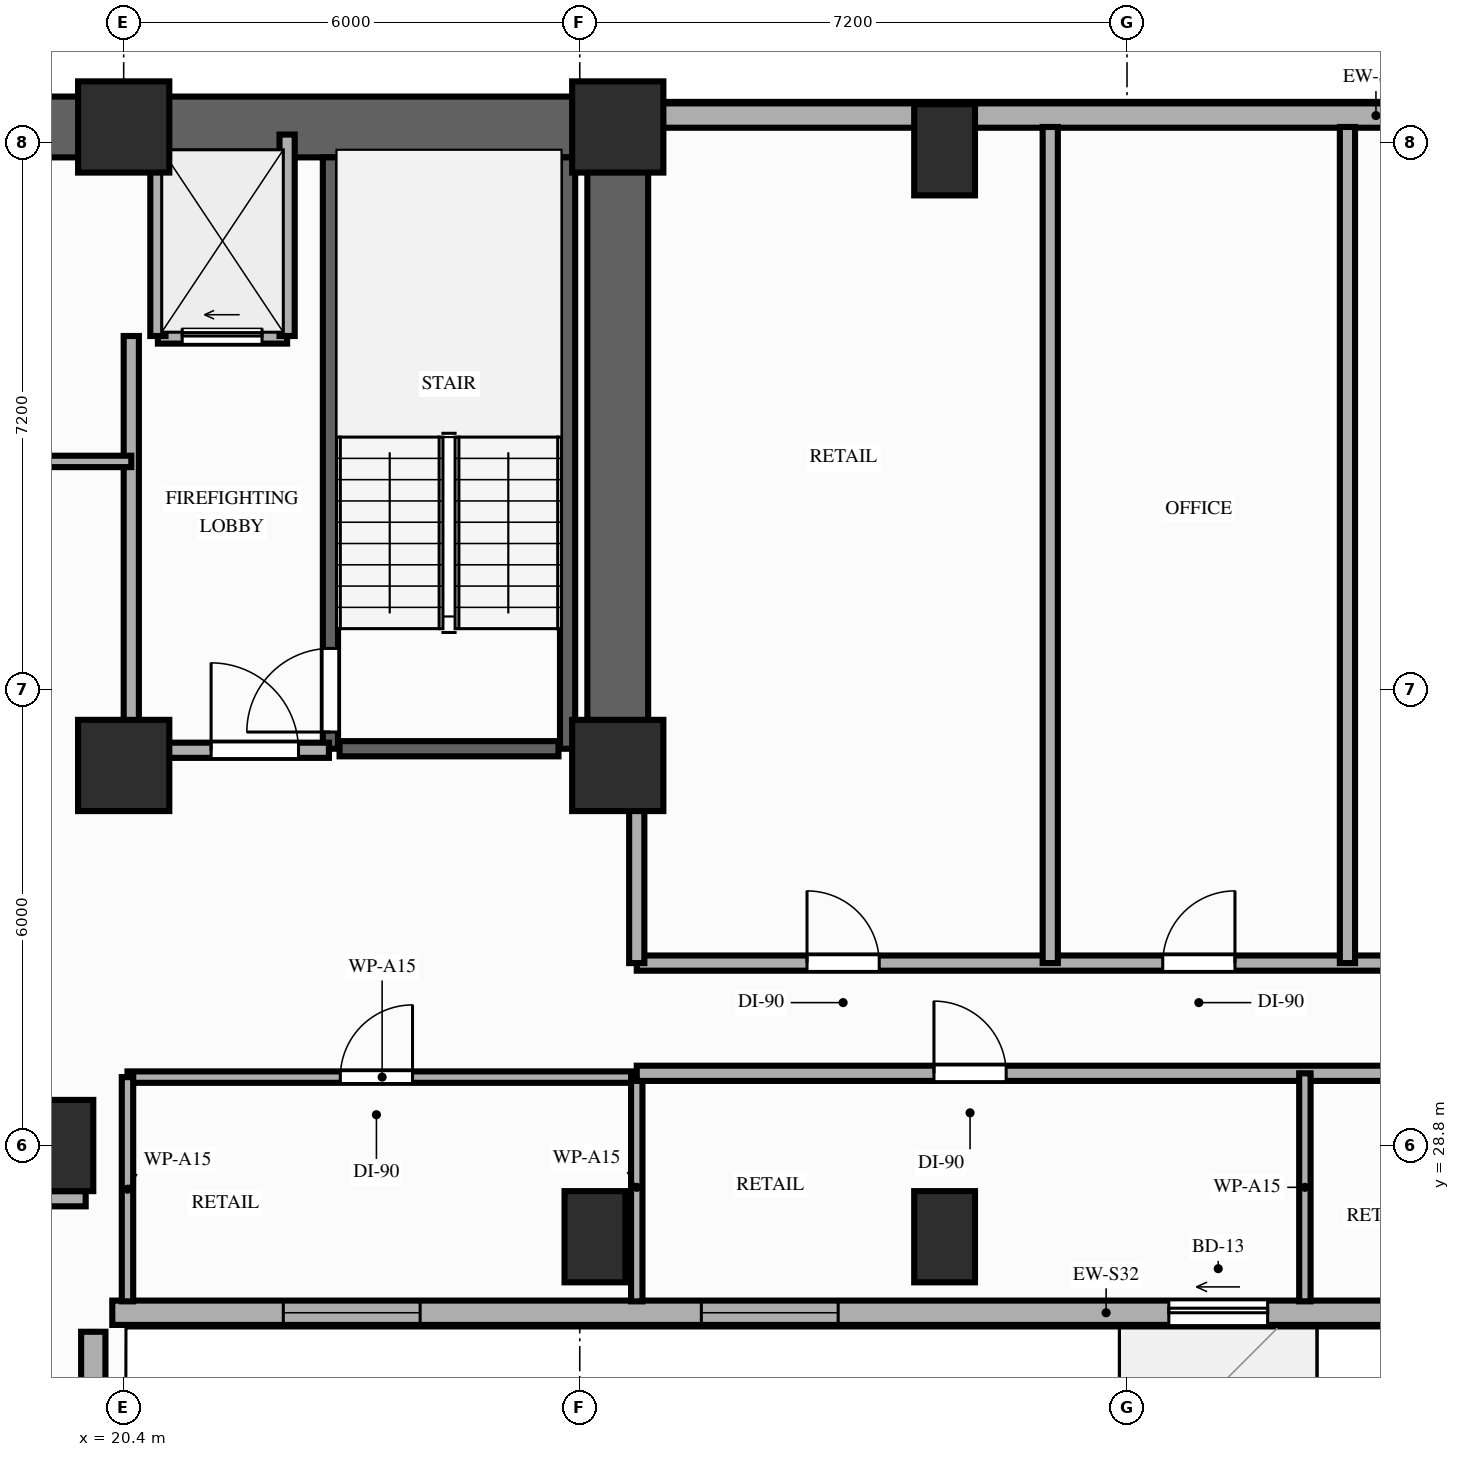
"""IFC4 building model, lengths in metres.
Left out: names, types, materials, properties, quantities, classifications, styles, units other than length and angle.
Written with IfcOpenShell. Run it as: python <this file> out.ifc"""

import sys

from ifc_helpers import new_model, si_unit, direction, frame, frame_2d, origin, origin_2d, place, context, subcontext, project, spatial, rectangle, extrude, element, fill, save


model = new_model("IFC4")
c1 = context("Model", 3, precision=1e-05, world=origin(), true_north=direction((0.0, 1.0)))
c2 = subcontext(c1, "Body", "Model", "MODEL_VIEW")
j1 = project(units=[si_unit("LENGTHUNIT", "METRE"), si_unit("PLANEANGLEUNIT", "RADIAN")], contexts=[c1])
p1 = place(None, origin())
s1 = spatial("IfcSite", under=j1, at=p1, CompositionType="ELEMENT")
p2 = place(p1, origin())
s2 = spatial("IfcBuilding", under=s1, at=p2, CompositionType="ELEMENT")
p3 = place(p2, frame((0.0, 0.0, 96.2)))
s3 = spatial("IfcBuildingStorey", under=s2, at=p3, CompositionType="ELEMENT", Elevation=96.2)
for number, where, z_axis, x_axis in (
    (1, (20.4, 33.8, 0.0), (0.0, 0.0, 1.0), (1.0, 0.0, 0.0)),
    (2, (26.9, 33.8, 0.0), (0.0, 0.0, 1.0), (1.0, 0.0, 0.0)),
    (3, (20.4, 42.2, 0.0), (0.0, 0.0, 1.0), (1.0, 0.0, 0.0)),
    (4, (26.9, 42.2, 0.0), (0.0, 0.0, 1.0), (1.0, 0.0, 0.0)),
):
    element("IfcColumn", number, at=place(p3, frame(where, z_axis=z_axis, x_axis=x_axis)), inside=s3, PredefinedType="COLUMN", context=c2, shape_type="SweptSolid", body=[
        extrude(rectangle(XDim=1.2, YDim=1.2, at=origin_2d()), origin(), (0.0, 0.0, 1.0), 3.2),
    ])
for number, where, z_axis, x_axis in (
    (5, (19.6, 28.8, 0.0), (0.0, 0.0, 1.0), (1.0, 0.0, 0.0)),
    (6, (26.6, 27.6, 0.0), (0.0, 0.0, 1.0), (1.0, 0.0, 0.0)),
    (7, (31.2, 27.6, 0.0), (0.0, 0.0, 1.0), (1.0, 0.0, 0.0)),
    (8, (31.2, 41.9, 0.0), (0.0, 0.0, 1.0), (1.0, 0.0, 0.0)),
):
    element("IfcColumn", number, at=place(p3, frame(where, z_axis=z_axis, x_axis=x_axis)), inside=s3, PredefinedType="COLUMN", context=c2, shape_type="SweptSolid", body=[
        extrude(rectangle(XDim=0.8, YDim=1.2, at=origin_2d()), origin(), (0.0, 0.0, 1.0), 3.2),
    ])
p4 = place(p3, frame((20.0, 8.8, 0.0), z_axis=(0.0, 0.0, 1.0), x_axis=(0.0, 1.0, 0.0)))
e9 = element("IfcWall", 9, at=p4, inside=s3, PredefinedType="STANDARD", context=c2, shape_type="SweptSolid", body=[
    extrude(rectangle(XDim=17.55, YDim=0.32, at=frame_2d((8.775, 0.0))), origin(), (0.0, 0.0, 1.0), 2.41),
])
p5 = place(p4, frame((11.0, 0.0, 0.85)))
e10 = element("IfcOpeningElement", 10, at=p5, cuts=e9, PredefinedType="OPENING", context=c2, shape_type="SweptSolid", body=[
    extrude(rectangle(XDim=1.8, YDim=1.31, at=frame_2d((0.9, 0.655))), frame((0.0, 0.17, 0.0), z_axis=(0.0, -1.0, 0.0), x_axis=(1.0, 0.0, 0.0)), (0.0, 0.0, 1.0), 0.34),
])
p6 = place(p3, frame((46.4, 42.35, 0.0), z_axis=(0.0, 0.0, 1.0), x_axis=(-1.0, 0.0, 0.0)))
e11 = element("IfcWall", 11, at=p6, inside=s3, PredefinedType="STANDARD", context=c2, shape_type="SweptSolid", body=[
    extrude(rectangle(XDim=19.05, YDim=0.32, at=frame_2d((9.525, 0.0))), origin(), (0.0, 0.0, 1.0), 2.41),
])
p7 = place(p3, frame((20.25, 26.6, 0.0), z_axis=(0.0, 0.0, 1.0), x_axis=(1.0, 0.0, 0.0)))
e12 = element("IfcWall", 12, at=p7, inside=s3, PredefinedType="STANDARD", context=c2, shape_type="SweptSolid", body=[
    extrude(rectangle(XDim=26.15, YDim=0.32, at=frame_2d((13.075, 0.0))), origin(), (0.0, 0.0, 1.0), 2.71),
])
p8 = place(p7, frame((13.9, 0.0, 0.0)))
e13 = element("IfcOpeningElement", 13, at=p8, cuts=e12, PredefinedType="OPENING", context=c2, shape_type="SweptSolid", body=[
    extrude(rectangle(XDim=1.3, YDim=2.08, at=frame_2d((0.65, 1.04))), frame((0.0, 0.17, 0.0), z_axis=(0.0, -1.0, 0.0), x_axis=(1.0, 0.0, 0.0)), (0.0, 0.0, 1.0), 0.34),
])
p9 = place(p7, frame((2.25, 0.0, 0.85)))
e14 = element("IfcOpeningElement", 14, at=p9, cuts=e12, PredefinedType="OPENING", context=c2, shape_type="SweptSolid", body=[
    extrude(rectangle(XDim=1.8, YDim=1.61, at=frame_2d((0.9, 0.805))), frame((0.0, 0.17, 0.0), z_axis=(0.0, -1.0, 0.0), x_axis=(1.0, 0.0, 0.0)), (0.0, 0.0, 1.0), 0.34),
])
p10 = place(p7, frame((7.75, 0.0, 0.85)))
e15 = element("IfcOpeningElement", 15, at=p10, cuts=e12, PredefinedType="OPENING", context=c2, shape_type="SweptSolid", body=[
    extrude(rectangle(XDim=1.8, YDim=1.61, at=frame_2d((0.9, 0.805))), frame((0.0, 0.17, 0.0), z_axis=(0.0, -1.0, 0.0), x_axis=(1.0, 0.0, 0.0)), (0.0, 0.0, 1.0), 0.34),
])
p11 = place(p7, frame((22.25, 0.0, 0.85)))
e16 = element("IfcOpeningElement", 16, at=p11, cuts=e12, PredefinedType="OPENING", context=c2, shape_type="SweptSolid", body=[
    extrude(rectangle(XDim=1.8, YDim=1.61, at=frame_2d((0.9, 0.805))), frame((0.0, 0.17, 0.0), z_axis=(0.0, -1.0, 0.0), x_axis=(1.0, 0.0, 0.0)), (0.0, 0.0, 1.0), 0.34),
])
p12 = place(p3, frame((6.45, 42.2, 0.0), z_axis=(0.0, 0.0, 1.0), x_axis=(1.0, 0.0, 0.0)))
e17 = element("IfcWall", 17, at=p12, inside=s3, PredefinedType="SHEAR", context=c2, shape_type="SweptSolid", body=[
    extrude(rectangle(XDim=20.45, YDim=0.8, at=frame_2d((10.225, 0.0))), origin(), (0.0, 0.0, 1.0), 3.02),
])
p13 = place(p3, frame((26.9, 33.8, 0.0), z_axis=(0.0, 0.0, 1.0), x_axis=(0.0, 1.0, 0.0)))
e18 = element("IfcWall", 18, at=p13, inside=s3, PredefinedType="SHEAR", context=c2, shape_type="SweptSolid", body=[
    extrude(rectangle(XDim=7.95, YDim=0.8, at=frame_2d((3.975, 0.0))), origin(), (0.0, 0.0, 1.0), 3.02),
])
p14 = place(p3, frame((23.12, 34.02, 0.0), z_axis=(0.0, 0.0, 1.0), x_axis=(0.0, 1.0, 0.0)))
e19 = element("IfcWall", 19, at=p14, inside=s3, PredefinedType="SHEAR", context=c2, shape_type="SweptSolid", body=[
    extrude(rectangle(XDim=7.78, YDim=0.2, at=frame_2d((3.89, 0.0))), origin(), (0.0, 0.0, 1.0), 3.02),
])
p15 = place(p14, frame((0.22, 0.0, 0.0)))
e20 = element("IfcOpeningElement", 20, at=p15, cuts=e19, PredefinedType="OPENING", context=c2, shape_type="SweptSolid", body=[
    extrude(rectangle(XDim=1.1, YDim=2.15, at=frame_2d((0.55, 1.075))), frame((0.0, 0.11, 0.0), z_axis=(0.0, -1.0, 0.0), x_axis=(1.0, 0.0, 0.0)), (0.0, 0.0, 1.0), 0.22),
])
p16 = place(p3, frame((26.24, 34.02, 0.0), z_axis=(0.0, 0.0, 1.0), x_axis=(0.0, 1.0, 0.0)))
e21 = element("IfcWall", 21, at=p16, inside=s3, PredefinedType="SHEAR", context=c2, shape_type="SweptSolid", body=[
    extrude(rectangle(XDim=7.78, YDim=0.2, at=frame_2d((3.89, 0.0))), origin(), (0.0, 0.0, 1.0), 3.02),
])
p17 = place(p3, frame((23.24, 34.02, 0.0), z_axis=(0.0, 0.0, 1.0), x_axis=(1.0, 0.0, 0.0)))
e22 = element("IfcWall", 22, at=p17, inside=s3, PredefinedType="SHEAR", context=c2, shape_type="SweptSolid", body=[
    extrude(rectangle(XDim=2.88, YDim=0.2, at=frame_2d((1.44, 0.0))), origin(), (0.0, 0.0, 1.0), 3.02),
])
p18 = place(p3, frame((20.85, 39.45, 0.0), z_axis=(0.0, 0.0, 1.0), x_axis=(1.0, 0.0, 0.0)))
e23 = element("IfcWall", 23, at=p18, inside=s3, PredefinedType="MOVABLE", context=c2, shape_type="SweptSolid", body=[
    extrude(rectangle(XDim=1.7, YDim=0.2, at=frame_2d((0.85, 0.0))), origin(), (0.0, 0.0, 1.0), 3.02),
])
p19 = place(p18, frame((0.32, 0.0, 0.0)))
e24 = element("IfcOpeningElement", 24, at=p19, cuts=e23, PredefinedType="OPENING", context=c2, shape_type="SweptSolid", body=[
    extrude(rectangle(XDim=1.05, YDim=2.15, at=frame_2d((0.525, 1.075))), frame((0.0, 0.11, 0.0), z_axis=(0.0, -1.0, 0.0), x_axis=(1.0, 0.0, 0.0)), (0.0, 0.0, 1.0), 0.22),
])
for number, where, z_axis, x_axis in (
    (25, (20.85, 39.45, 0.0), (0.0, 0.0, 1.0), (0.0, 1.0, 0.0)),
    (26, (22.55, 39.45, 0.0), (0.0, 0.0, 1.0), (0.0, 1.0, 0.0)),
):
    element("IfcWall", number, at=place(p3, frame(where, z_axis=z_axis, x_axis=x_axis)), inside=s3, PredefinedType="MOVABLE", context=c2, shape_type="SweptSolid", body=[
        extrude(rectangle(XDim=2.65, YDim=0.2, at=frame_2d((1.325, 0.0))), origin(), (0.0, 0.0, 1.0), 2.41),
    ])
p20 = place(p3, frame((20.5, 34.0, 0.0), z_axis=(0.0, 0.0, 1.0), x_axis=(0.0, 1.0, 0.0)))
e27 = element("IfcWall", 27, at=p20, inside=s3, PredefinedType="PARTITIONING", context=c2, shape_type="SweptSolid", body=[
    extrude(rectangle(XDim=5.45, YDim=0.2, at=frame_2d((2.725, 0.0))), origin(), (0.0, 0.0, 1.0), 2.41),
])
p21 = place(p3, frame((20.5, 34.0, 0.0), z_axis=(0.0, 0.0, 1.0), x_axis=(1.0, 0.0, 0.0)))
e28 = element("IfcWall", 28, at=p21, inside=s3, PredefinedType="PARTITIONING", context=c2, shape_type="SweptSolid", body=[
    extrude(rectangle(XDim=2.6, YDim=0.2, at=frame_2d((1.3, 0.0))), origin(), (0.0, 0.0, 1.0), 2.41),
])
p22 = place(p21, frame((1.05, 0.0, 0.0)))
e29 = element("IfcOpeningElement", 29, at=p22, cuts=e28, PredefinedType="OPENING", context=c2, shape_type="SweptSolid", body=[
    extrude(rectangle(XDim=1.15, YDim=2.15, at=frame_2d((0.575, 1.075))), frame((0.0, 0.11, 0.0), z_axis=(0.0, -1.0, 0.0), x_axis=(1.0, 0.0, 0.0)), (0.0, 0.0, 1.0), 0.22),
])
p23 = place(p3, frame((12.9, 37.8, 0.0), z_axis=(0.0, 0.0, 1.0), x_axis=(1.0, 0.0, 0.0)))
e30 = element("IfcWall", 30, at=p23, inside=s3, PredefinedType="PARTITIONING", context=c2, shape_type="SweptSolid", body=[
    extrude(rectangle(XDim=7.6, YDim=0.15, at=frame_2d((3.8, 0.0))), origin(), (0.0, 0.0, 1.0), 3.02),
])
p24 = place(p23, frame((3.2, 0.0, 0.0)))
e31 = element("IfcOpeningElement", 31, at=p24, cuts=e30, PredefinedType="OPENING", context=c2, shape_type="SweptSolid", body=[
    extrude(rectangle(XDim=1.0, YDim=2.15, at=frame_2d((0.5, 1.075))), frame((0.0, 0.085, 0.0), z_axis=(0.0, -1.0, 0.0), x_axis=(1.0, 0.0, 0.0)), (0.0, 0.0, 1.0), 0.17),
])
p25 = place(p3, frame((14.66, 28.1, 0.0), z_axis=(0.0, 0.0, 1.0), x_axis=(1.0, 0.0, 0.0)))
e32 = element("IfcWall", 32, at=p25, inside=s3, PredefinedType="PARTITIONING", context=c2, shape_type="SweptSolid", body=[
    extrude(rectangle(XDim=5.24, YDim=0.2, at=frame_2d((2.62, 0.0))), origin(), (0.0, 0.0, 1.0), 2.41),
])
p26 = place(p3, frame((20.45, 29.7, 0.0), z_axis=(0.0, 0.0, 1.0), x_axis=(1.0, 0.0, 0.0)))
e33 = element("IfcWall", 33, at=p26, inside=s3, PredefinedType="PARTITIONING", context=c2, shape_type="SweptSolid", body=[
    extrude(rectangle(XDim=6.7, YDim=0.15, at=frame_2d((3.35, 0.0))), origin(), (0.0, 0.0, 1.0), 3.02),
])
p27 = place(p26, frame((2.8, 0.0, 0.0)))
e34 = element("IfcOpeningElement", 34, at=p27, cuts=e33, PredefinedType="OPENING", context=c2, shape_type="SweptSolid", body=[
    extrude(rectangle(XDim=0.95, YDim=2.15, at=frame_2d((0.475, 1.075))), frame((0.0, 0.085, 0.0), z_axis=(0.0, -1.0, 0.0), x_axis=(1.0, 0.0, 0.0)), (0.0, 0.0, 1.0), 0.17),
])
p28 = place(p3, frame((20.45, 26.75, 0.0), z_axis=(0.0, 0.0, 1.0), x_axis=(0.0, 1.0, 0.0)))
e35 = element("IfcWall", 35, at=p28, inside=s3, PredefinedType="PARTITIONING", context=c2, shape_type="SweptSolid", body=[
    extrude(rectangle(XDim=2.95, YDim=0.15, at=frame_2d((1.475, 0.0))), origin(), (0.0, 0.0, 1.0), 2.41),
])
p29 = place(p3, frame((27.15, 26.75, 0.0), z_axis=(0.0, 0.0, 1.0), x_axis=(0.0, 1.0, 0.0)))
e36 = element("IfcWall", 36, at=p29, inside=s3, PredefinedType="PARTITIONING", context=c2, shape_type="SweptSolid", body=[
    extrude(rectangle(XDim=3.0, YDim=0.15, at=frame_2d((1.5, 0.0))), origin(), (0.0, 0.0, 1.0), 2.41),
])
p30 = place(p3, frame((27.15, 29.75, 0.0), z_axis=(0.0, 0.0, 1.0), x_axis=(1.0, 0.0, 0.0)))
e37 = element("IfcWall", 37, at=p30, inside=s3, PredefinedType="PARTITIONING", context=c2, shape_type="SweptSolid", body=[
    extrude(rectangle(XDim=13.95, YDim=0.2, at=frame_2d((6.975, 0.0))), origin(), (0.0, 0.0, 1.0), 2.41),
])
p31 = place(p30, frame((3.91, 0.0, 0.0)))
e38 = element("IfcOpeningElement", 38, at=p31, cuts=e37, PredefinedType="OPENING", context=c2, shape_type="SweptSolid", body=[
    extrude(rectangle(XDim=0.95, YDim=2.15, at=frame_2d((0.475, 1.075))), frame((0.0, 0.11, 0.0), z_axis=(0.0, -1.0, 0.0), x_axis=(1.0, 0.0, 0.0)), (0.0, 0.0, 1.0), 0.22),
])
p32 = place(p30, frame((10.89, 0.0, 0.0)))
e39 = element("IfcOpeningElement", 39, at=p32, cuts=e37, PredefinedType="OPENING", context=c2, shape_type="SweptSolid", body=[
    extrude(rectangle(XDim=0.95, YDim=2.15, at=frame_2d((0.475, 1.075))), frame((0.0, 0.11, 0.0), z_axis=(0.0, -1.0, 0.0), x_axis=(1.0, 0.0, 0.0)), (0.0, 0.0, 1.0), 0.22),
])
p33 = place(p3, frame((27.15, 31.2, 0.0), z_axis=(0.0, 0.0, 1.0), x_axis=(1.0, 0.0, 0.0)))
e40 = element("IfcWall", 40, at=p33, inside=s3, PredefinedType="PARTITIONING", context=c2, shape_type="SweptSolid", body=[
    extrude(rectangle(XDim=13.95, YDim=0.2, at=frame_2d((6.975, 0.0))), origin(), (0.0, 0.0, 1.0), 2.41),
])
p34 = place(p33, frame((2.24, 0.0, 0.0)))
e41 = element("IfcOpeningElement", 41, at=p34, cuts=e40, PredefinedType="OPENING", context=c2, shape_type="SweptSolid", body=[
    extrude(rectangle(XDim=0.95, YDim=2.15, at=frame_2d((0.475, 1.075))), frame((0.0, 0.11, 0.0), z_axis=(0.0, -1.0, 0.0), x_axis=(1.0, 0.0, 0.0)), (0.0, 0.0, 1.0), 0.22),
])
p35 = place(p33, frame((6.92, 0.0, 0.0)))
e42 = element("IfcOpeningElement", 42, at=p35, cuts=e40, PredefinedType="OPENING", context=c2, shape_type="SweptSolid", body=[
    extrude(rectangle(XDim=0.95, YDim=2.15, at=frame_2d((0.475, 1.075))), frame((0.0, 0.11, 0.0), z_axis=(0.0, -1.0, 0.0), x_axis=(1.0, 0.0, 0.0)), (0.0, 0.0, 1.0), 0.22),
])
p36 = place(p33, frame((11.17, 0.0, 0.0)))
e43 = element("IfcOpeningElement", 43, at=p36, cuts=e40, PredefinedType="OPENING", context=c2, shape_type="SweptSolid", body=[
    extrude(rectangle(XDim=0.95, YDim=2.15, at=frame_2d((0.475, 1.075))), frame((0.0, 0.11, 0.0), z_axis=(0.0, -1.0, 0.0), x_axis=(1.0, 0.0, 0.0)), (0.0, 0.0, 1.0), 0.22),
])
p37 = place(p3, frame((27.15, 31.2, 0.0), z_axis=(0.0, 0.0, 1.0), x_axis=(0.0, 1.0, 0.0)))
e44 = element("IfcWall", 44, at=p37, inside=s3, PredefinedType="PARTITIONING", context=c2, shape_type="SweptSolid", body=[
    extrude(rectangle(XDim=2.48, YDim=0.2, at=frame_2d((1.24, 0.0))), origin(), (0.0, 0.0, 1.0), 2.41),
])
p38 = place(p3, frame((35.94, 26.75, 0.0), z_axis=(0.0, 0.0, 1.0), x_axis=(0.0, 1.0, 0.0)))
e45 = element("IfcWall", 45, at=p38, inside=s3, PredefinedType="PARTITIONING", context=c2, shape_type="SweptSolid", body=[
    extrude(rectangle(XDim=3.0, YDim=0.15, at=frame_2d((1.5, 0.0))), origin(), (0.0, 0.0, 1.0), 2.41),
])
for number, where, z_axis, x_axis in (
    (46, (32.59, 31.2, 0.0), (0.0, 0.0, 1.0), (0.0, 1.0, 0.0)),
    (47, (36.5, 31.2, 0.0), (0.0, 0.0, 1.0), (0.0, 1.0, 0.0)),
):
    element("IfcWall", number, at=place(p3, frame(where, z_axis=z_axis, x_axis=x_axis)), inside=s3, PredefinedType="PARTITIONING", context=c2, shape_type="SweptSolid", body=[
        extrude(rectangle(XDim=11.0, YDim=0.2, at=frame_2d((5.5, 0.0))), origin(), (0.0, 0.0, 1.0), 2.41),
    ])
p39 = place(p8, origin())
e48 = element("IfcDoor", 48, at=p39, inside=s3, OperationType="SLIDING_TO_LEFT", PredefinedType="DOOR", context=c2, shape_type="SweptSolid", body=[
    extrude(rectangle(XDim=1.3, YDim=2.08, at=frame_2d((0.65, 1.04))), frame((0.0, 0.025, 0.0), z_axis=(0.0, -1.0, 0.0), x_axis=(1.0, 0.0, 0.0)), (0.0, 0.0, 1.0), 0.05),
])
fill(e13, e48)
p40 = place(p9, origin())
e49 = element("IfcWindow", 49, at=p40, inside=s3, PartitioningType="SINGLE_PANEL", PredefinedType="WINDOW", context=c2, shape_type="SweptSolid", body=[
    extrude(rectangle(XDim=1.8, YDim=1.61, at=frame_2d((0.9, 0.805))), frame((0.0, 0.03, 0.0), z_axis=(0.0, -1.0, 0.0), x_axis=(1.0, 0.0, 0.0)), (0.0, 0.0, 1.0), 0.06),
])
fill(e14, e49)
p41 = place(p10, origin())
e50 = element("IfcWindow", 50, at=p41, inside=s3, PartitioningType="SINGLE_PANEL", PredefinedType="WINDOW", context=c2, shape_type="SweptSolid", body=[
    extrude(rectangle(XDim=1.8, YDim=1.61, at=frame_2d((0.9, 0.805))), frame((0.0, 0.03, 0.0), z_axis=(0.0, -1.0, 0.0), x_axis=(1.0, 0.0, 0.0)), (0.0, 0.0, 1.0), 0.06),
])
fill(e15, e50)
p42 = place(p15, origin())
e51 = element("IfcDoor", 51, at=p42, inside=s3, OperationType="SINGLE_SWING_LEFT", PredefinedType="DOOR", context=c2, shape_type="SweptSolid", body=[
    extrude(rectangle(XDim=1.1, YDim=2.15, at=frame_2d((0.55, 1.075))), frame((0.0, 0.025, 0.0), z_axis=(0.0, -1.0, 0.0), x_axis=(1.0, 0.0, 0.0)), (0.0, 0.0, 1.0), 0.05),
])
fill(e20, e51)
p43 = place(p19, origin())
e52 = element("IfcDoor", 52, at=p43, inside=s3, OperationType="SLIDING_TO_LEFT", PredefinedType="DOOR", context=c2, shape_type="SweptSolid", body=[
    extrude(rectangle(XDim=1.05, YDim=2.15, at=frame_2d((0.525, 1.075))), frame((0.0, 0.025, 0.0), z_axis=(0.0, -1.0, 0.0), x_axis=(1.0, 0.0, 0.0)), (0.0, 0.0, 1.0), 0.05),
])
fill(e24, e52)
p44 = place(p22, origin())
e53 = element("IfcDoor", 53, at=p44, inside=s3, OperationType="SINGLE_SWING_LEFT", PredefinedType="DOOR", context=c2, shape_type="SweptSolid", body=[
    extrude(rectangle(XDim=1.15, YDim=2.15, at=frame_2d((0.575, 1.075))), frame((0.0, 0.025, 0.0), z_axis=(0.0, -1.0, 0.0), x_axis=(1.0, 0.0, 0.0)), (0.0, 0.0, 1.0), 0.05),
])
fill(e29, e53)
p45 = place(p27, origin())
e54 = element("IfcDoor", 54, at=p45, inside=s3, OperationType="SINGLE_SWING_RIGHT", PredefinedType="DOOR", context=c2, shape_type="SweptSolid", body=[
    extrude(rectangle(XDim=0.95, YDim=2.15, at=frame_2d((0.475, 1.075))), frame((0.0, 0.025, 0.0), z_axis=(0.0, -1.0, 0.0), x_axis=(1.0, 0.0, 0.0)), (0.0, 0.0, 1.0), 0.05),
])
fill(e34, e54)
p46 = place(p31, origin())
e55 = element("IfcDoor", 55, at=p46, inside=s3, OperationType="SINGLE_SWING_LEFT", PredefinedType="DOOR", context=c2, shape_type="SweptSolid", body=[
    extrude(rectangle(XDim=0.95, YDim=2.15, at=frame_2d((0.475, 1.075))), frame((0.0, 0.025, 0.0), z_axis=(0.0, -1.0, 0.0), x_axis=(1.0, 0.0, 0.0)), (0.0, 0.0, 1.0), 0.05),
])
fill(e38, e55)
p47 = place(p34, origin())
e56 = element("IfcDoor", 56, at=p47, inside=s3, OperationType="SINGLE_SWING_LEFT", PredefinedType="DOOR", context=c2, shape_type="SweptSolid", body=[
    extrude(rectangle(XDim=0.95, YDim=2.15, at=frame_2d((0.475, 1.075))), frame((0.0, 0.025, 0.0), z_axis=(0.0, -1.0, 0.0), x_axis=(1.0, 0.0, 0.0)), (0.0, 0.0, 1.0), 0.05),
])
fill(e41, e56)
p48 = place(p35, origin())
e57 = element("IfcDoor", 57, at=p48, inside=s3, OperationType="SINGLE_SWING_RIGHT", PredefinedType="DOOR", context=c2, shape_type="SweptSolid", body=[
    extrude(rectangle(XDim=0.95, YDim=2.15, at=frame_2d((0.475, 1.075))), frame((0.0, 0.025, 0.0), z_axis=(0.0, -1.0, 0.0), x_axis=(1.0, 0.0, 0.0)), (0.0, 0.0, 1.0), 0.05),
])
fill(e42, e57)
save(model, sys.argv[1])
